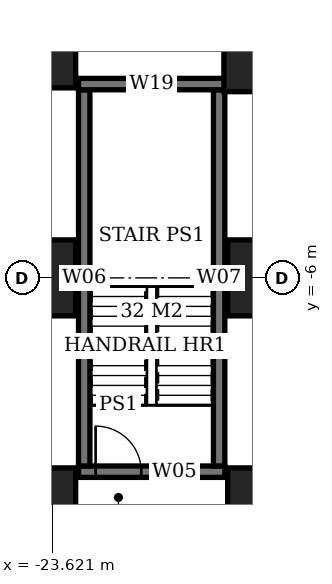
"""IFC4 building model, lengths in metres.
Left out: names, types, materials, properties, quantities, classifications, styles, units other than length and angle.
Written with IfcOpenShell. Run it as: python <this file> out.ifc"""

import sys

from ifc_helpers import new_model, si_unit, direction, frame, frame_2d, origin, origin_2d, place, context, subcontext, project, spatial, rectangle, extrude, element, fill, save


model = new_model("IFC4")
c1 = context("Model", 3, precision=1e-05, world=origin(), true_north=direction((0.0, 1.0)))
c2 = subcontext(c1, "Body", "Model", "MODEL_VIEW")
j1 = project(units=[si_unit("LENGTHUNIT", "METRE"), si_unit("PLANEANGLEUNIT", "RADIAN")], contexts=[c1])
p1 = place(None, origin())
s1 = spatial("IfcSite", under=j1, at=p1, CompositionType="ELEMENT")
p2 = place(p1, origin())
s2 = spatial("IfcBuilding", under=s1, at=p2, CompositionType="ELEMENT")
p3 = place(p2, frame((0.0, 0.0, -4.5)))
s3 = spatial("IfcBuildingStorey", under=s2, at=p3, CompositionType="ELEMENT", Elevation=-4.5)
for number, where, z_axis, x_axis in (
    (1, (-24.0, -12.0, 0.0), (0.0, 0.0, 1.0), (1.0, 0.0, 0.0)),
    (2, (-24.0, -6.0, 0.0), (0.0, 0.0, 1.0), (1.0, 0.0, 0.0)),
    (3, (-24.0, 0.0, 0.0), (0.0, 0.0, 1.0), (1.0, 0.0, 0.0)),
):
    element("IfcColumn", number, at=place(p3, frame(where, z_axis=z_axis, x_axis=x_axis)), inside=s3, PredefinedType="COLUMN", context=c2, shape_type="SweptSolid", body=[
        extrude(rectangle(XDim=2.0, YDim=2.0, at=origin_2d()), origin(), (0.0, 0.0, 1.0), 4.05),
    ])
for number, where, z_axis, x_axis in (
    (4, (-18.0, -12.0, 0.0), (0.0, 0.0, 1.0), (1.0, 0.0, 0.0)),
    (5, (-18.0, -6.0, 0.0), (0.0, 0.0, 1.0), (1.0, 0.0, 0.0)),
):
    element("IfcColumn", number, at=place(p3, frame(where, z_axis=z_axis, x_axis=x_axis)), inside=s3, PredefinedType="COLUMN", context=c2, shape_type="SweptSolid", body=[
        extrude(rectangle(XDim=2.0, YDim=2.0, at=origin_2d()), origin(), (0.0, 0.0, 1.0), 4.5),
    ])
p4 = place(p3, frame((-18.0, 0.0, 0.0), z_axis=(0.0, 0.0, 1.0), x_axis=(1.0, 0.0, 0.0)))
e6 = element("IfcColumn", 6, at=p4, inside=s3, PredefinedType="COLUMN", context=c2, shape_type="SweptSolid", body=[
    extrude(rectangle(XDim=2.2, YDim=2.2, at=origin_2d()), origin(), (0.0, 0.0, 1.0), 4.5),
])
p5 = place(p3, frame((-22.925, -11.1, 0.0), z_axis=(0.0, 0.0, 1.0), x_axis=(1.0, 0.0, 0.0)))
e7 = element("IfcWall", 7, at=p5, inside=s3, PredefinedType="SOLIDWALL", context=c2, shape_type="SweptSolid", body=[
    extrude(rectangle(XDim=3.85, YDim=0.3, at=frame_2d((1.925, 0.0))), origin(), (0.0, 0.0, 1.0), 4.05),
])
p6 = place(p5, frame((0.45, 0.0, 0.0)))
e8 = element("IfcOpeningElement", 8, at=p6, cuts=e7, PredefinedType="OPENING", context=c2, shape_type="SweptSolid", body=[
    extrude(rectangle(XDim=1.2, YDim=2.1, at=frame_2d((0.6, 1.05))), frame((0.0, 0.16, 0.0), z_axis=(0.0, -1.0, 0.0), x_axis=(1.0, 0.0, 0.0)), (0.0, 0.0, 1.0), 0.32),
])
p7 = place(p3, frame((-22.925, -0.9, 0.0), z_axis=(0.0, 0.0, 1.0), x_axis=(1.0, 0.0, 0.0)))
e9 = element("IfcWall", 9, at=p7, inside=s3, PredefinedType="SOLIDWALL", context=c2, shape_type="SweptSolid", body=[
    extrude(rectangle(XDim=3.85, YDim=0.3, at=frame_2d((1.925, 0.0))), origin(), (0.0, 0.0, 1.0), 4.05),
])
for number, where, z_axis, x_axis in (
    (10, (-22.775, -10.95, 0.0), (0.0, 0.0, 1.0), (0.0, 1.0, 0.0)),
    (11, (-19.225, -10.95, 0.0), (0.0, 0.0, 1.0), (0.0, 1.0, 0.0)),
):
    element("IfcWall", number, at=place(p3, frame(where, z_axis=z_axis, x_axis=x_axis)), inside=s3, PredefinedType="SOLIDWALL", context=c2, shape_type="SweptSolid", body=[
        extrude(rectangle(XDim=9.9, YDim=0.3, at=frame_2d((4.95, 0.0))), origin(), (0.0, 0.0, 1.0), 4.05),
    ])
p8 = place(p6, origin())
e12 = element("IfcDoor", 12, at=p8, inside=s3, OperationType="SINGLE_SWING_LEFT", PredefinedType="DOOR", context=c2, shape_type="SweptSolid", body=[
    extrude(rectangle(XDim=1.2, YDim=2.1, at=frame_2d((0.6, 1.05))), frame((0.0, 0.025, 0.0), z_axis=(0.0, -1.0, 0.0), x_axis=(1.0, 0.0, 0.0)), (0.0, 0.0, 1.0), 0.05),
])
fill(e8, e12)
save(model, sys.argv[1])
